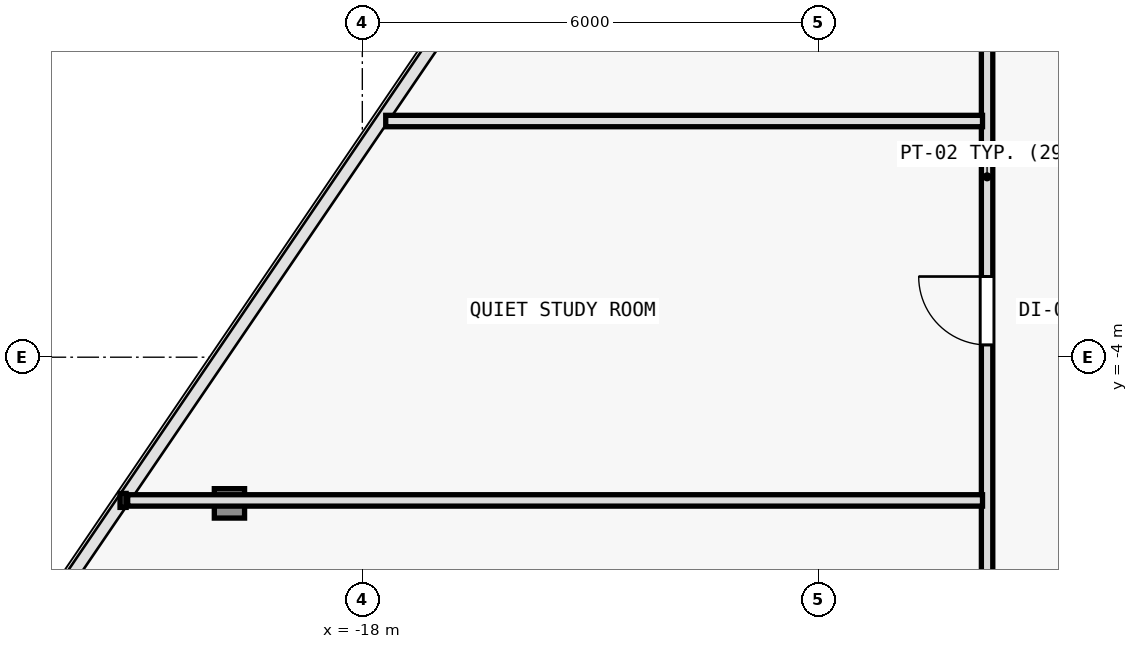
"""IFC4 building model, lengths in metres.
Left out: names, types, materials, properties, quantities, classifications, styles, units other than length and angle.
Written with IfcOpenShell. Run it as: python <this file> out.ifc"""

import sys

from ifc_helpers import new_model, si_unit, direction, frame, frame_2d, origin, origin_2d, place, context, subcontext, project, spatial, rectangle, i_section, extrude, element, fill, save


model = new_model("IFC4")
c1 = context("Model", 3, precision=1e-05, world=origin(), true_north=direction((0.0, 1.0)))
c2 = subcontext(c1, "Body", "Model", "MODEL_VIEW")
j1 = project(units=[si_unit("LENGTHUNIT", "METRE"), si_unit("PLANEANGLEUNIT", "RADIAN")], contexts=[c1])
p1 = place(None, origin())
s1 = spatial("IfcSite", under=j1, at=p1, CompositionType="ELEMENT")
p2 = place(p1, origin())
s2 = spatial("IfcBuilding", under=s1, at=p2, CompositionType="ELEMENT")
p3 = place(p2, frame((0.0, 0.0, 216.3)))
s3 = spatial("IfcBuildingStorey", under=s2, at=p3, CompositionType="ELEMENT", Elevation=216.3)
p4 = place(p3, frame((-19.748, -5.923, 0.005), z_axis=(0.025222449659, 0.021619242565, 0.999448065876), x_axis=(-0.650791373456, 0.759256602365, 0.0)))
e1 = element("IfcColumn", 1, at=p4, inside=s3, PredefinedType="COLUMN", context=c2, shape_type="SweptSolid", body=[
    extrude(i_section(OverallWidth=0.398, OverallDepth=0.387, WebThickness=0.013, FlangeThickness=0.022, FilletRadius=0.015, at=origin_2d()), origin(), (0.0, 0.0, 1.0), 3.591),
])
p5 = place(p3, frame((-9.78, -11.48, 0.0), z_axis=(0.0, 0.0, 1.0), x_axis=(0.0, 1.0, 0.0)))
e2 = element("IfcWall", 2, at=p5, inside=s3, PredefinedType="PARTITIONING", context=c2, shape_type="SweptSolid", body=[
    extrude(rectangle(XDim=19.706, YDim=0.15, at=frame_2d((9.853, 0.0))), origin(), (0.0, 0.0, 1.0), 2.825),
])
p6 = place(p5, frame((7.641, 0.0, 0.0)))
e3 = element("IfcOpeningElement", 3, at=p6, cuts=e2, PredefinedType="OPENING", context=c2, shape_type="SweptSolid", body=[
    extrude(rectangle(XDim=0.9, YDim=2.1, at=frame_2d((0.45, 1.05))), frame((0.0, 0.085, 0.0), z_axis=(0.0, -1.0, 0.0), x_axis=(1.0, 0.0, 0.0)), (0.0, 0.0, 1.0), 0.17),
])
p7 = place(p5, frame((2.437, 0.0, 0.0)))
e4 = element("IfcOpeningElement", 4, at=p7, cuts=e2, PredefinedType="OPENING", context=c2, shape_type="SweptSolid", body=[
    extrude(rectangle(XDim=0.9, YDim=2.1, at=frame_2d((0.45, 1.05))), frame((0.0, 0.085, 0.0), z_axis=(0.0, -1.0, 0.0), x_axis=(1.0, 0.0, 0.0)), (0.0, 0.0, 1.0), 0.17),
])
p8 = place(p5, frame((12.545, 0.0, 0.0)))
e5 = element("IfcOpeningElement", 5, at=p8, cuts=e2, PredefinedType="OPENING", context=c2, shape_type="SweptSolid", body=[
    extrude(rectangle(XDim=0.9, YDim=2.1, at=frame_2d((0.45, 1.05))), frame((0.0, 0.085, 0.0), z_axis=(0.0, -1.0, 0.0), x_axis=(1.0, 0.0, 0.0)), (0.0, 0.0, 1.0), 0.17),
])
p9 = place(p3, frame((-9.84, -5.884, 0.0), z_axis=(0.0, 0.0, 1.0), x_axis=(-1.0, 0.0, 0.0)))
e6 = element("IfcWall", 6, at=p9, inside=s3, PredefinedType="PARTITIONING", context=c2, shape_type="SweptSolid", body=[
    extrude(rectangle(XDim=11.247, YDim=0.15, at=frame_2d((5.624, 0.0))), origin(), (0.0, 0.0, 1.0), 2.825),
])
p10 = place(p3, frame((-9.84, -0.893, 0.0), z_axis=(0.0, 0.0, 1.0), x_axis=(-1.0, 0.0, 0.0)))
e7 = element("IfcWall", 7, at=p10, inside=s3, PredefinedType="PARTITIONING", context=c2, shape_type="SweptSolid", body=[
    extrude(rectangle(XDim=7.852, YDim=0.15, at=frame_2d((3.926, 0.0))), origin(), (0.0, 0.0, 1.0), 2.925),
])
p11 = place(p6, origin())
e8 = element("IfcDoor", 8, at=p11, inside=s3, OperationType="SINGLE_SWING_RIGHT", PredefinedType="DOOR", context=c2, shape_type="SweptSolid", body=[
    extrude(rectangle(XDim=0.9, YDim=2.1, at=frame_2d((0.45, 1.05))), frame((0.0, 0.025, 0.0), z_axis=(0.0, -1.0, 0.0), x_axis=(1.0, 0.0, 0.0)), (0.0, 0.0, 1.0), 0.05),
])
fill(e3, e8)
save(model, sys.argv[1])
